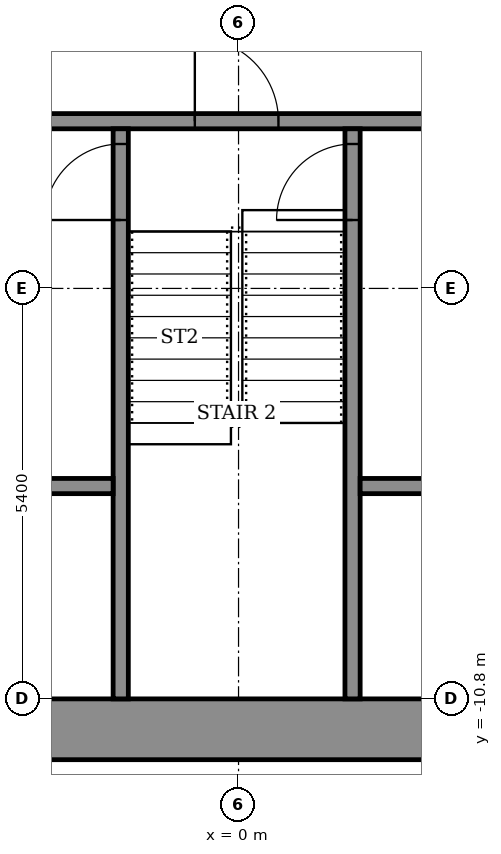
"""IFC4 building model, lengths in metres.
Left out: names, types, materials, properties, quantities, classifications, styles, units other than length and angle.
Written with IfcOpenShell. Run it as: python <this file> out.ifc"""

import sys

from ifc_helpers import new_model, si_unit, direction, frame, frame_2d, origin, place, context, subcontext, project, spatial, rectangle, extrude, element, fill, save


model = new_model("IFC4")
c1 = context("Model", 3, precision=1e-05, world=origin(), true_north=direction((0.0, 1.0)))
c2 = subcontext(c1, "Body", "Model", "MODEL_VIEW")
j1 = project(units=[si_unit("LENGTHUNIT", "METRE"), si_unit("PLANEANGLEUNIT", "RADIAN")], contexts=[c1])
p1 = place(None, origin())
s1 = spatial("IfcSite", under=j1, at=p1, CompositionType="ELEMENT")
p2 = place(p1, origin())
s2 = spatial("IfcBuilding", under=s1, at=p2, CompositionType="ELEMENT")
p3 = place(p2, frame((0.0, 0.0, 205.1)))
s3 = spatial("IfcBuildingStorey", under=s2, at=p3, CompositionType="ELEMENT", Elevation=205.1)
p4 = place(p3, frame((-14.6, -11.2, 0.0), z_axis=(0.0, 0.0, 1.0), x_axis=(1.0, 0.0, 0.0)))
e1 = element("IfcWall", 1, at=p4, inside=s3, PredefinedType="SHEAR", context=c2, shape_type="SweptSolid", body=[
    extrude(rectangle(XDim=29.2, YDim=0.8, at=frame_2d((14.6, 0.0))), origin(), (0.0, 0.0, 1.0), 3.6),
])
p5 = place(p3, frame((-10.9, -3.2, 0.0), z_axis=(0.0, 0.0, 1.0), x_axis=(1.0, 0.0, 0.0)))
e2 = element("IfcWall", 2, at=p5, inside=s3, PredefinedType="SHEAR", context=c2, shape_type="SweptSolid", body=[
    extrude(rectangle(XDim=21.8, YDim=0.2, at=frame_2d((10.9, 0.0))), origin(), (0.0, 0.0, 1.0), 3.05),
])
p6 = place(p5, frame((1.075, 0.0, 0.0)))
e3 = element("IfcOpeningElement", 3, at=p6, cuts=e2, PredefinedType="OPENING", context=c2, shape_type="SweptSolid", body=[
    extrude(rectangle(XDim=1.1, YDim=2.1, at=frame_2d((0.55, 1.05))), frame((0.0, 0.11, 0.0), z_axis=(0.0, -1.0, 0.0), x_axis=(1.0, 0.0, 0.0)), (0.0, 0.0, 1.0), 0.22),
])
p7 = place(p5, frame((10.325, 0.0, 0.0)))
e4 = element("IfcOpeningElement", 4, at=p7, cuts=e2, PredefinedType="OPENING", context=c2, shape_type="SweptSolid", body=[
    extrude(rectangle(XDim=1.1, YDim=2.1, at=frame_2d((0.55, 1.05))), frame((0.0, 0.11, 0.0), z_axis=(0.0, -1.0, 0.0), x_axis=(1.0, 0.0, 0.0)), (0.0, 0.0, 1.0), 0.22),
])
p8 = place(p5, frame((19.625, 0.0, 0.0)))
e5 = element("IfcOpeningElement", 5, at=p8, cuts=e2, PredefinedType="OPENING", context=c2, shape_type="SweptSolid", body=[
    extrude(rectangle(XDim=1.1, YDim=2.1, at=frame_2d((0.55, 1.05))), frame((0.0, 0.11, 0.0), z_axis=(0.0, -1.0, 0.0), x_axis=(1.0, 0.0, 0.0)), (0.0, 0.0, 1.0), 0.22),
])
p9 = place(p5, frame((5.7, 0.0, 0.0)))
e6 = element("IfcOpeningElement", 6, at=p9, cuts=e2, PredefinedType="OPENING", context=c2, shape_type="SweptSolid", body=[
    extrude(rectangle(XDim=1.1, YDim=2.1, at=frame_2d((0.55, 1.05))), frame((0.0, 0.11, 0.0), z_axis=(0.0, -1.0, 0.0), x_axis=(1.0, 0.0, 0.0)), (0.0, 0.0, 1.0), 0.22),
])
p10 = place(p5, frame((14.975, 0.0, 0.0)))
e7 = element("IfcOpeningElement", 7, at=p10, cuts=e2, PredefinedType="OPENING", context=c2, shape_type="SweptSolid", body=[
    extrude(rectangle(XDim=1.1, YDim=2.1, at=frame_2d((0.55, 1.05))), frame((0.0, 0.11, 0.0), z_axis=(0.0, -1.0, 0.0), x_axis=(1.0, 0.0, 0.0)), (0.0, 0.0, 1.0), 0.22),
])
p11 = place(p3, frame((-1.55, -10.8, 0.0), z_axis=(0.0, 0.0, 1.0), x_axis=(0.0, 1.0, 0.0)))
e8 = element("IfcWall", 8, at=p11, inside=s3, PredefinedType="SHEAR", context=c2, shape_type="SweptSolid", body=[
    extrude(rectangle(XDim=7.5, YDim=0.2, at=frame_2d((3.75, 0.0))), origin(), (0.0, 0.0, 1.0), 3.05),
])
p12 = place(p11, frame((6.3, 0.0, 0.0)))
e9 = element("IfcOpeningElement", 9, at=p12, cuts=e8, PredefinedType="OPENING", context=c2, shape_type="SweptSolid", body=[
    extrude(rectangle(XDim=1.0, YDim=2.1, at=frame_2d((0.5, 1.05))), frame((0.0, 0.11, 0.0), z_axis=(0.0, -1.0, 0.0), x_axis=(1.0, 0.0, 0.0)), (0.0, 0.0, 1.0), 0.22),
])
p13 = place(p3, frame((1.5, -10.8, 0.0), z_axis=(0.0, 0.0, 1.0), x_axis=(0.0, 1.0, 0.0)))
e10 = element("IfcWall", 10, at=p13, inside=s3, PredefinedType="SHEAR", context=c2, shape_type="SweptSolid", body=[
    extrude(rectangle(XDim=7.5, YDim=0.2, at=frame_2d((3.75, 0.0))), origin(), (0.0, 0.0, 1.0), 3.05),
])
p14 = place(p13, frame((6.3, 0.0, 0.0)))
e11 = element("IfcOpeningElement", 11, at=p14, cuts=e10, PredefinedType="OPENING", context=c2, shape_type="SweptSolid", body=[
    extrude(rectangle(XDim=1.0, YDim=2.1, at=frame_2d((0.5, 1.05))), frame((0.0, 0.11, 0.0), z_axis=(0.0, -1.0, 0.0), x_axis=(1.0, 0.0, 0.0)), (0.0, 0.0, 1.0), 0.22),
])
p15 = place(p3, frame((-7.65, -8.0, 0.0), z_axis=(0.0, 0.0, 1.0), x_axis=(1.0, 0.0, 0.0)))
e12 = element("IfcWall", 12, at=p15, inside=s3, PredefinedType="SHEAR", context=c2, shape_type="SweptSolid", body=[
    extrude(rectangle(XDim=6.0, YDim=0.2, at=frame_2d((3.0, 0.0))), origin(), (0.0, 0.0, 1.0), 3.05),
])
p16 = place(p15, frame((0.9, 0.0, 0.0)))
e13 = element("IfcOpeningElement", 13, at=p16, cuts=e12, PredefinedType="OPENING", context=c2, shape_type="SweptSolid", body=[
    extrude(rectangle(XDim=1.1, YDim=2.1, at=frame_2d((0.55, 1.05))), frame((0.0, 0.11, 0.0), z_axis=(0.0, -1.0, 0.0), x_axis=(1.0, 0.0, 0.0)), (0.0, 0.0, 1.0), 0.22),
])
p17 = place(p15, frame((4.0, 0.0, 0.0)))
e14 = element("IfcOpeningElement", 14, at=p17, cuts=e12, PredefinedType="OPENING", context=c2, shape_type="SweptSolid", body=[
    extrude(rectangle(XDim=1.1, YDim=2.1, at=frame_2d((0.55, 1.05))), frame((0.0, 0.11, 0.0), z_axis=(0.0, -1.0, 0.0), x_axis=(1.0, 0.0, 0.0)), (0.0, 0.0, 1.0), 0.22),
])
p18 = place(p3, frame((1.6, -8.0, 0.0), z_axis=(0.0, 0.0, 1.0), x_axis=(1.0, 0.0, 0.0)))
e15 = element("IfcWall", 15, at=p18, inside=s3, PredefinedType="SHEAR", context=c2, shape_type="SweptSolid", body=[
    extrude(rectangle(XDim=6.05, YDim=0.2, at=frame_2d((3.025, 0.0))), origin(), (0.0, 0.0, 1.0), 3.05),
])
p19 = place(p18, frame((0.913, 0.0, 0.0)))
e16 = element("IfcOpeningElement", 16, at=p19, cuts=e15, PredefinedType="OPENING", context=c2, shape_type="SweptSolid", body=[
    extrude(rectangle(XDim=1.1, YDim=2.1, at=frame_2d((0.55, 1.05))), frame((0.0, 0.11, 0.0), z_axis=(0.0, -1.0, 0.0), x_axis=(1.0, 0.0, 0.0)), (0.0, 0.0, 1.0), 0.22),
])
p20 = place(p18, frame((4.038, 0.0, 0.0)))
e17 = element("IfcOpeningElement", 17, at=p20, cuts=e15, PredefinedType="OPENING", context=c2, shape_type="SweptSolid", body=[
    extrude(rectangle(XDim=1.1, YDim=2.1, at=frame_2d((0.55, 1.05))), frame((0.0, 0.11, 0.0), z_axis=(0.0, -1.0, 0.0), x_axis=(1.0, 0.0, 0.0)), (0.0, 0.0, 1.0), 0.22),
])
p21 = place(p7, origin())
e18 = element("IfcDoor", 18, at=p21, inside=s3, OperationType="SINGLE_SWING_RIGHT", PredefinedType="DOOR", context=c2, shape_type="SweptSolid", body=[
    extrude(rectangle(XDim=1.1, YDim=2.1, at=frame_2d((0.55, 1.05))), frame((0.0, 0.025, 0.0), z_axis=(0.0, -1.0, 0.0), x_axis=(1.0, 0.0, 0.0)), (0.0, 0.0, 1.0), 0.05),
])
fill(e4, e18)
p22 = place(p12, origin())
e19 = element("IfcDoor", 19, at=p22, inside=s3, OperationType="SINGLE_SWING_RIGHT", PredefinedType="DOOR", context=c2, shape_type="SweptSolid", body=[
    extrude(rectangle(XDim=1.0, YDim=2.1, at=frame_2d((0.5, 1.05))), frame((0.0, 0.025, 0.0), z_axis=(0.0, -1.0, 0.0), x_axis=(1.0, 0.0, 0.0)), (0.0, 0.0, 1.0), 0.05),
])
fill(e9, e19)
p23 = place(p14, origin())
e20 = element("IfcDoor", 20, at=p23, inside=s3, OperationType="SINGLE_SWING_RIGHT", PredefinedType="DOOR", context=c2, shape_type="SweptSolid", body=[
    extrude(rectangle(XDim=1.0, YDim=2.1, at=frame_2d((0.5, 1.05))), frame((0.0, 0.025, 0.0), z_axis=(0.0, -1.0, 0.0), x_axis=(1.0, 0.0, 0.0)), (0.0, 0.0, 1.0), 0.05),
])
fill(e11, e20)
save(model, sys.argv[1])
